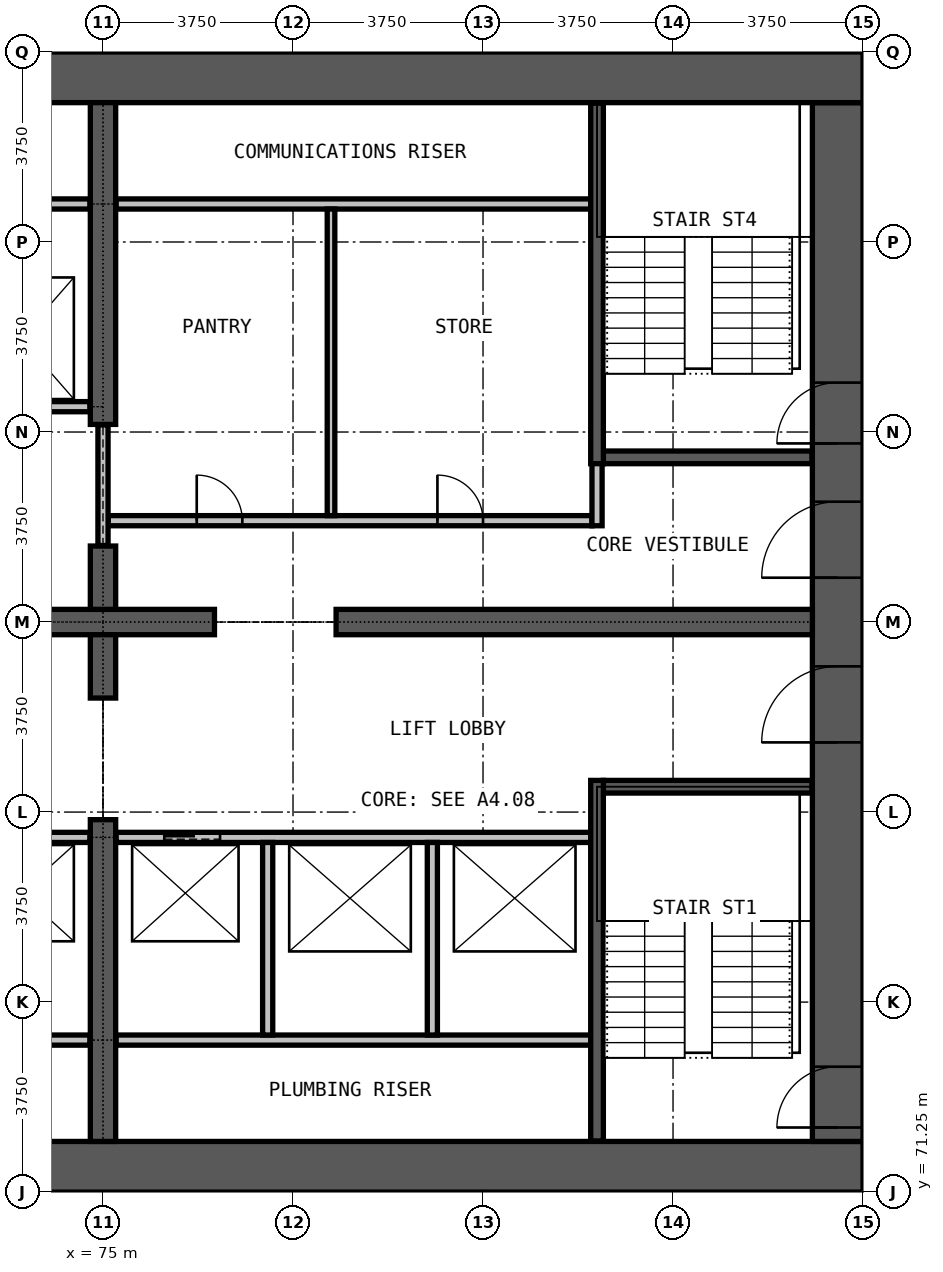
"""IFC4 building model, lengths in metres.
Left out: names, types, materials, properties, quantities, classifications, styles, units other than length and angle.
Written with IfcOpenShell. Run it as: python <this file> out.ifc"""

import sys

from ifc_helpers import new_model, si_unit, direction, frame, frame_2d, origin, place, context, subcontext, project, spatial, rectangle, extrude, element, fill, save


model = new_model("IFC4")
c1 = context("Model", 3, precision=1e-05, world=origin(), true_north=direction((0.0, 1.0)))
c2 = subcontext(c1, "Body", "Model", "MODEL_VIEW")
j1 = project(units=[si_unit("LENGTHUNIT", "METRE"), si_unit("PLANEANGLEUNIT", "RADIAN")], contexts=[c1])
p1 = place(None, origin())
s1 = spatial("IfcSite", under=j1, at=p1, CompositionType="ELEMENT")
p2 = place(p1, origin())
s2 = spatial("IfcBuilding", under=s1, at=p2, CompositionType="ELEMENT")
p3 = place(p2, frame((0.0, 0.0, 52.7)))
s3 = spatial("IfcBuildingStorey", under=s2, at=p3, CompositionType="ELEMENT", Elevation=52.7)
p4 = place(p3, frame((60.0, 71.75, 0.0), z_axis=(0.0, 0.0, 1.0), x_axis=(1.0, 0.0, 0.0)))
e1 = element("IfcWall", 1, at=p4, inside=s3, PredefinedType="SHEAR", context=c2, shape_type="SweptSolid", body=[
    extrude(rectangle(XDim=30.0, YDim=1.0, at=frame_2d((15.0, 0.0))), origin(), (0.0, 0.0, 1.0), 3.3),
])
p5 = place(p3, frame((89.5, 72.25, 0.0), z_axis=(0.0, 0.0, 1.0), x_axis=(0.0, 1.0, 0.0)))
e2 = element("IfcWall", 2, at=p5, inside=s3, PredefinedType="SHEAR", context=c2, shape_type="SweptSolid", body=[
    extrude(rectangle(XDim=20.5, YDim=1.0, at=frame_2d((10.25, 0.0))), origin(), (0.0, 0.0, 1.0), 3.3),
])
p6 = place(p5, frame((0.275, 0.0, 0.0)))
e3 = element("IfcOpeningElement", 3, at=p6, cuts=e2, PredefinedType="OPENING", context=c2, shape_type="SweptSolid", body=[
    extrude(rectangle(XDim=1.2, YDim=2.2, at=frame_2d((0.6, 1.1))), frame((0.0, 0.51, 0.0), z_axis=(0.0, -1.0, 0.0), x_axis=(1.0, 0.0, 0.0)), (0.0, 0.0, 1.0), 1.02),
])
p7 = place(p5, frame((13.775, 0.0, 0.0)))
e4 = element("IfcOpeningElement", 4, at=p7, cuts=e2, PredefinedType="OPENING", context=c2, shape_type="SweptSolid", body=[
    extrude(rectangle(XDim=1.2, YDim=2.2, at=frame_2d((0.6, 1.1))), frame((0.0, 0.51, 0.0), z_axis=(0.0, -1.0, 0.0), x_axis=(1.0, 0.0, 0.0)), (0.0, 0.0, 1.0), 1.02),
])
p8 = place(p5, frame((7.875, 0.0, 0.0)))
e5 = element("IfcOpeningElement", 5, at=p8, cuts=e2, PredefinedType="OPENING", context=c2, shape_type="SweptSolid", body=[
    extrude(rectangle(XDim=1.5, YDim=2.2, at=frame_2d((0.75, 1.1))), frame((0.0, 0.51, 0.0), z_axis=(0.0, -1.0, 0.0), x_axis=(1.0, 0.0, 0.0)), (0.0, 0.0, 1.0), 1.02),
])
p9 = place(p5, frame((11.125, 0.0, 0.0)))
e6 = element("IfcOpeningElement", 6, at=p9, cuts=e2, PredefinedType="OPENING", context=c2, shape_type="SweptSolid", body=[
    extrude(rectangle(XDim=1.5, YDim=2.2, at=frame_2d((0.75, 1.1))), frame((0.0, 0.51, 0.0), z_axis=(0.0, -1.0, 0.0), x_axis=(1.0, 0.0, 0.0)), (0.0, 0.0, 1.0), 1.02),
])
p10 = place(p3, frame((90.0, 93.25, 0.0), z_axis=(0.0, 0.0, 1.0), x_axis=(-1.0, 0.0, 0.0)))
e7 = element("IfcWall", 7, at=p10, inside=s3, PredefinedType="SHEAR", context=c2, shape_type="SweptSolid", body=[
    extrude(rectangle(XDim=30.0, YDim=1.0, at=frame_2d((15.0, 0.0))), origin(), (0.0, 0.0, 1.0), 3.3),
])
p11 = place(p3, frame((72.8, 82.5, 0.0), z_axis=(0.0, 0.0, 1.0), x_axis=(1.0, 0.0, 0.0)))
e8 = element("IfcWall", 8, at=p11, inside=s3, PredefinedType="SHEAR", context=c2, shape_type="SweptSolid", body=[
    extrude(rectangle(XDim=4.4, YDim=0.5, at=frame_2d((2.2, 0.0))), origin(), (0.0, 0.0, 1.0), 3.3),
])
p12 = place(p3, frame((79.6, 82.5, 0.0), z_axis=(0.0, 0.0, 1.0), x_axis=(1.0, 0.0, 0.0)))
e9 = element("IfcWall", 9, at=p12, inside=s3, PredefinedType="SHEAR", context=c2, shape_type="SweptSolid", body=[
    extrude(rectangle(XDim=9.4, YDim=0.5, at=frame_2d((4.7, 0.0))), origin(), (0.0, 0.0, 1.0), 3.3),
])
p13 = place(p3, frame((75.0, 72.25, 0.0), z_axis=(0.0, 0.0, 1.0), x_axis=(0.0, 1.0, 0.0)))
e10 = element("IfcWall", 10, at=p13, inside=s3, PredefinedType="SHEAR", context=c2, shape_type="SweptSolid", body=[
    extrude(rectangle(XDim=6.35, YDim=0.5, at=frame_2d((3.175, 0.0))), origin(), (0.0, 0.0, 1.0), 3.3),
])
for number, where, z_axis, x_axis in (
    (11, (75.0, 81.0, 0.0), (0.0, 0.0, 1.0), (0.0, 1.0, 0.0)),
    (12, (75.0, 82.75, 0.0), (0.0, 0.0, 1.0), (0.0, 1.0, 0.0)),
):
    element("IfcWall", number, at=place(p3, frame(where, z_axis=z_axis, x_axis=x_axis)), inside=s3, PredefinedType="SHEAR", context=c2, shape_type="SweptSolid", body=[
        extrude(rectangle(XDim=1.25, YDim=0.5, at=frame_2d((0.625, 0.0))), origin(), (0.0, 0.0, 1.0), 3.3),
    ])
p14 = place(p3, frame((75.0, 86.4, 0.0), z_axis=(0.0, 0.0, 1.0), x_axis=(0.0, 1.0, 0.0)))
e13 = element("IfcWall", 13, at=p14, inside=s3, PredefinedType="SHEAR", context=c2, shape_type="SweptSolid", body=[
    extrude(rectangle(XDim=6.35, YDim=0.5, at=frame_2d((3.175, 0.0))), origin(), (0.0, 0.0, 1.0), 3.3),
])
p15 = place(p3, frame((75.1, 84.5, 0.0), z_axis=(0.0, 0.0, 1.0), x_axis=(1.0, 0.0, 0.0)))
e14 = element("IfcWall", 14, at=p15, inside=s3, PredefinedType="PARTITIONING", context=c2, shape_type="SweptSolid", body=[
    extrude(rectangle(XDim=9.55, YDim=0.2, at=frame_2d((4.775, 0.0))), origin(), (0.0, 0.0, 1.0), 3.0),
])
p16 = place(p15, frame((1.75, 0.0, 0.0)))
e15 = element("IfcOpeningElement", 15, at=p16, cuts=e14, PredefinedType="OPENING", context=c2, shape_type="SweptSolid", body=[
    extrude(rectangle(XDim=0.9, YDim=2.2, at=frame_2d((0.45, 1.1))), frame((0.0, 0.11, 0.0), z_axis=(0.0, -1.0, 0.0), x_axis=(1.0, 0.0, 0.0)), (0.0, 0.0, 1.0), 0.22),
])
p17 = place(p15, frame((6.5, 0.0, 0.0)))
e16 = element("IfcOpeningElement", 16, at=p17, cuts=e14, PredefinedType="OPENING", context=c2, shape_type="SweptSolid", body=[
    extrude(rectangle(XDim=0.9, YDim=2.2, at=frame_2d((0.45, 1.1))), frame((0.0, 0.11, 0.0), z_axis=(0.0, -1.0, 0.0), x_axis=(1.0, 0.0, 0.0)), (0.0, 0.0, 1.0), 0.22),
])
p18 = place(p3, frame((75.26, 90.75, 0.0), z_axis=(0.0, 0.0, 1.0), x_axis=(1.0, 0.0, 0.0)))
e17 = element("IfcWall", 17, at=p18, inside=s3, PredefinedType="PARTITIONING", context=c2, shape_type="SweptSolid", body=[
    extrude(rectangle(XDim=9.365, YDim=0.2, at=frame_2d((4.683, 0.0))), origin(), (0.0, 0.0, 1.0), 3.0),
])
p19 = place(p3, frame((75.0, 84.01, 0.0), z_axis=(0.0, 0.0, 1.0), x_axis=(0.0, 1.0, 0.0)))
e18 = element("IfcWall", 18, at=p19, inside=s3, PredefinedType="PARTITIONING", context=c2, shape_type="SweptSolid", body=[
    extrude(rectangle(XDim=2.38, YDim=0.2, at=frame_2d((1.19, 0.0))), origin(), (0.0, 0.0, 1.0), 2.4),
])
p20 = place(p3, frame((84.75, 84.4, 0.0), z_axis=(0.0, 0.0, 1.0), x_axis=(0.0, 1.0, 0.0)))
e19 = element("IfcWall", 19, at=p20, inside=s3, PredefinedType="PARTITIONING", context=c2, shape_type="SweptSolid", body=[
    extrude(rectangle(XDim=1.475, YDim=0.2, at=frame_2d((0.738, 0.0))), origin(), (0.0, 0.0, 1.0), 3.0),
])
p21 = place(p3, frame((79.5, 84.6, 0.0), z_axis=(0.0, 0.0, 1.0), x_axis=(0.0, 1.0, 0.0)))
e20 = element("IfcWall", 20, at=p21, inside=s3, PredefinedType="PARTITIONING", context=c2, shape_type="SweptSolid", body=[
    extrude(rectangle(XDim=6.05, YDim=0.15, at=frame_2d((3.025, 0.0))), origin(), (0.0, 0.0, 1.0), 3.0),
])
for number, where, z_axis, x_axis in (
    (21, (65.375, 74.25, 0.0), (0.0, 0.0, 1.0), (1.0, 0.0, 0.0)),
    (22, (75.26, 74.25, 0.0), (0.0, 0.0, 1.0), (1.0, 0.0, 0.0)),
):
    element("IfcWall", number, at=place(p3, frame(where, z_axis=z_axis, x_axis=x_axis)), inside=s3, PredefinedType="PARTITIONING", context=c2, shape_type="SweptSolid", body=[
        extrude(rectangle(XDim=9.365, YDim=0.2, at=frame_2d((4.683, 0.0))), origin(), (0.0, 0.0, 1.0), 3.0),
    ])
p22 = place(p3, frame((65.375, 78.25, 0.0), z_axis=(0.0, 0.0, 1.0), x_axis=(1.0, 0.0, 0.0)))
e23 = element("IfcWall", 23, at=p22, inside=s3, PredefinedType="PARTITIONING", context=c2, shape_type="SweptSolid", body=[
    extrude(rectangle(XDim=9.365, YDim=0.2, at=frame_2d((4.683, 0.0))), origin(), (0.0, 0.0, 1.0), 3.0),
])
p23 = place(p22, frame((1.0, 0.0, 0.0)))
e24 = element("IfcOpeningElement", 24, at=p23, cuts=e23, PredefinedType="OPENING", context=c2, shape_type="SweptSolid", body=[
    extrude(rectangle(XDim=1.1, YDim=2.2, at=frame_2d((0.55, 1.1))), frame((0.0, 0.11, 0.0), z_axis=(0.0, -1.0, 0.0), x_axis=(1.0, 0.0, 0.0)), (0.0, 0.0, 1.0), 0.22),
])
p24 = place(p22, frame((4.175, 0.0, 0.0)))
e25 = element("IfcOpeningElement", 25, at=p24, cuts=e23, PredefinedType="OPENING", context=c2, shape_type="SweptSolid", body=[
    extrude(rectangle(XDim=1.1, YDim=2.2, at=frame_2d((0.55, 1.1))), frame((0.0, 0.11, 0.0), z_axis=(0.0, -1.0, 0.0), x_axis=(1.0, 0.0, 0.0)), (0.0, 0.0, 1.0), 0.22),
])
p25 = place(p22, frame((7.325, 0.0, 0.0)))
e26 = element("IfcOpeningElement", 26, at=p25, cuts=e23, PredefinedType="OPENING", context=c2, shape_type="SweptSolid", body=[
    extrude(rectangle(XDim=1.1, YDim=2.2, at=frame_2d((0.55, 1.1))), frame((0.0, 0.11, 0.0), z_axis=(0.0, -1.0, 0.0), x_axis=(1.0, 0.0, 0.0)), (0.0, 0.0, 1.0), 0.22),
])
p26 = place(p3, frame((75.26, 78.25, 0.0), z_axis=(0.0, 0.0, 1.0), x_axis=(1.0, 0.0, 0.0)))
e27 = element("IfcWall", 27, at=p26, inside=s3, PredefinedType="PARTITIONING", context=c2, shape_type="SweptSolid", body=[
    extrude(rectangle(XDim=9.365, YDim=0.2, at=frame_2d((4.683, 0.0))), origin(), (0.0, 0.0, 1.0), 3.0),
])
p27 = place(p26, frame((0.95, 0.0, 0.0)))
e28 = element("IfcOpeningElement", 28, at=p27, cuts=e27, PredefinedType="OPENING", context=c2, shape_type="SweptSolid", body=[
    extrude(rectangle(XDim=1.1, YDim=2.2, at=frame_2d((0.55, 1.1))), frame((0.0, 0.11, 0.0), z_axis=(0.0, -1.0, 0.0), x_axis=(1.0, 0.0, 0.0)), (0.0, 0.0, 1.0), 0.22),
])
p28 = place(p3, frame((65.375, 86.75, 0.0), z_axis=(0.0, 0.0, 1.0), x_axis=(1.0, 0.0, 0.0)))
e29 = element("IfcWall", 29, at=p28, inside=s3, PredefinedType="PARTITIONING", context=c2, shape_type="SweptSolid", body=[
    extrude(rectangle(XDim=9.365, YDim=0.2, at=frame_2d((4.683, 0.0))), origin(), (0.0, 0.0, 1.0), 3.0),
])
p29 = place(p28, frame((1.0, 0.0, 0.0)))
e30 = element("IfcOpeningElement", 30, at=p29, cuts=e29, PredefinedType="OPENING", context=c2, shape_type="SweptSolid", body=[
    extrude(rectangle(XDim=1.1, YDim=2.2, at=frame_2d((0.55, 1.1))), frame((0.0, 0.11, 0.0), z_axis=(0.0, -1.0, 0.0), x_axis=(1.0, 0.0, 0.0)), (0.0, 0.0, 1.0), 0.22),
])
p30 = place(p28, frame((4.175, 0.0, 0.0)))
e31 = element("IfcOpeningElement", 31, at=p30, cuts=e29, PredefinedType="OPENING", context=c2, shape_type="SweptSolid", body=[
    extrude(rectangle(XDim=1.1, YDim=2.2, at=frame_2d((0.55, 1.1))), frame((0.0, 0.11, 0.0), z_axis=(0.0, -1.0, 0.0), x_axis=(1.0, 0.0, 0.0)), (0.0, 0.0, 1.0), 0.22),
])
p31 = place(p28, frame((7.325, 0.0, 0.0)))
e32 = element("IfcOpeningElement", 32, at=p31, cuts=e29, PredefinedType="OPENING", context=c2, shape_type="SweptSolid", body=[
    extrude(rectangle(XDim=1.1, YDim=2.2, at=frame_2d((0.55, 1.1))), frame((0.0, 0.11, 0.0), z_axis=(0.0, -1.0, 0.0), x_axis=(1.0, 0.0, 0.0)), (0.0, 0.0, 1.0), 0.22),
])
p32 = place(p3, frame((65.375, 90.75, 0.0), z_axis=(0.0, 0.0, 1.0), x_axis=(1.0, 0.0, 0.0)))
e33 = element("IfcWall", 33, at=p32, inside=s3, PredefinedType="PARTITIONING", context=c2, shape_type="SweptSolid", body=[
    extrude(rectangle(XDim=9.365, YDim=0.2, at=frame_2d((4.683, 0.0))), origin(), (0.0, 0.0, 1.0), 3.0),
])
for number, where, z_axis, x_axis in (
    (34, (78.25, 74.35, 0.0), (0.0, 0.0, 1.0), (0.0, 1.0, 0.0)),
    (35, (81.5, 74.35, 0.0), (0.0, 0.0, 1.0), (0.0, 1.0, 0.0)),
):
    element("IfcWall", number, at=place(p3, frame(where, z_axis=z_axis, x_axis=x_axis)), inside=s3, PredefinedType="PARTITIONING", context=c2, shape_type="SweptSolid", body=[
        extrude(rectangle(XDim=3.8, YDim=0.2, at=frame_2d((1.9, 0.0))), origin(), (0.0, 0.0, 1.0), 3.0),
    ])
for number, where, z_axis, x_axis in (
    (36, (84.875, 79.25, 0.0), (0.0, 0.0, 1.0), (1.0, 0.0, 0.0)),
    (37, (84.875, 85.75, 0.0), (0.0, 0.0, 1.0), (1.0, 0.0, 0.0)),
):
    element("IfcWall", number, at=place(p3, frame(where, z_axis=z_axis, x_axis=x_axis)), inside=s3, PredefinedType="PARTITIONING", context=c2, shape_type="SweptSolid", body=[
        extrude(rectangle(XDim=4.115, YDim=0.25, at=frame_2d((2.058, 0.0))), origin(), (0.0, 0.0, 1.0), 3.0),
    ])
for number, where, z_axis, x_axis in (
    (38, (84.75, 72.26, 0.0), (0.0, 0.0, 1.0), (0.0, 1.0, 0.0)),
    (39, (84.75, 85.625, 0.0), (0.0, 0.0, 1.0), (0.0, 1.0, 0.0)),
):
    element("IfcWall", number, at=place(p3, frame(where, z_axis=z_axis, x_axis=x_axis)), inside=s3, PredefinedType="PARTITIONING", context=c2, shape_type="SweptSolid", body=[
        extrude(rectangle(XDim=7.115, YDim=0.25, at=frame_2d((3.558, 0.0))), origin(), (0.0, 0.0, 1.0), 3.0),
    ])
p33 = place(p27, origin())
e40 = element("IfcDoor", 40, at=p33, inside=s3, OperationType="DOUBLE_DOOR_SLIDING", PredefinedType="DOOR", context=c2, shape_type="SweptSolid", body=[
    extrude(rectangle(XDim=1.1, YDim=2.2, at=frame_2d((0.55, 1.1))), frame((0.0, 0.025, 0.0), z_axis=(0.0, -1.0, 0.0), x_axis=(1.0, 0.0, 0.0)), (0.0, 0.0, 1.0), 0.05),
])
fill(e28, e40)
p34 = place(p6, origin())
e41 = element("IfcDoor", 41, at=p34, inside=s3, OperationType="SINGLE_SWING_LEFT", PredefinedType="DOOR", context=c2, shape_type="SweptSolid", body=[
    extrude(rectangle(XDim=1.2, YDim=2.2, at=frame_2d((0.6, 1.1))), frame((0.0, 0.025, 0.0), z_axis=(0.0, -1.0, 0.0), x_axis=(1.0, 0.0, 0.0)), (0.0, 0.0, 1.0), 0.05),
])
fill(e3, e41)
p35 = place(p7, origin())
e42 = element("IfcDoor", 42, at=p35, inside=s3, OperationType="SINGLE_SWING_LEFT", PredefinedType="DOOR", context=c2, shape_type="SweptSolid", body=[
    extrude(rectangle(XDim=1.2, YDim=2.2, at=frame_2d((0.6, 1.1))), frame((0.0, 0.025, 0.0), z_axis=(0.0, -1.0, 0.0), x_axis=(1.0, 0.0, 0.0)), (0.0, 0.0, 1.0), 0.05),
])
fill(e4, e42)
p36 = place(p8, origin())
e43 = element("IfcDoor", 43, at=p36, inside=s3, OperationType="DOUBLE_DOOR_SINGLE_SWING", PredefinedType="DOOR", context=c2, shape_type="SweptSolid", body=[
    extrude(rectangle(XDim=1.5, YDim=2.2, at=frame_2d((0.75, 1.1))), frame((0.0, 0.025, 0.0), z_axis=(0.0, -1.0, 0.0), x_axis=(1.0, 0.0, 0.0)), (0.0, 0.0, 1.0), 0.05),
])
fill(e5, e43)
p37 = place(p9, origin())
e44 = element("IfcDoor", 44, at=p37, inside=s3, OperationType="DOUBLE_DOOR_SINGLE_SWING", PredefinedType="DOOR", context=c2, shape_type="SweptSolid", body=[
    extrude(rectangle(XDim=1.5, YDim=2.2, at=frame_2d((0.75, 1.1))), frame((0.0, 0.025, 0.0), z_axis=(0.0, -1.0, 0.0), x_axis=(1.0, 0.0, 0.0)), (0.0, 0.0, 1.0), 0.05),
])
fill(e6, e44)
p38 = place(p16, origin())
e45 = element("IfcDoor", 45, at=p38, inside=s3, OperationType="SINGLE_SWING_LEFT", PredefinedType="DOOR", context=c2, shape_type="SweptSolid", body=[
    extrude(rectangle(XDim=0.9, YDim=2.2, at=frame_2d((0.45, 1.1))), frame((0.0, 0.025, 0.0), z_axis=(0.0, -1.0, 0.0), x_axis=(1.0, 0.0, 0.0)), (0.0, 0.0, 1.0), 0.05),
])
fill(e15, e45)
p39 = place(p17, origin())
e46 = element("IfcDoor", 46, at=p39, inside=s3, OperationType="SINGLE_SWING_RIGHT", PredefinedType="DOOR", context=c2, shape_type="SweptSolid", body=[
    extrude(rectangle(XDim=0.9, YDim=2.2, at=frame_2d((0.45, 1.1))), frame((0.0, 0.025, 0.0), z_axis=(0.0, -1.0, 0.0), x_axis=(1.0, 0.0, 0.0)), (0.0, 0.0, 1.0), 0.05),
])
fill(e16, e46)
save(model, sys.argv[1])
